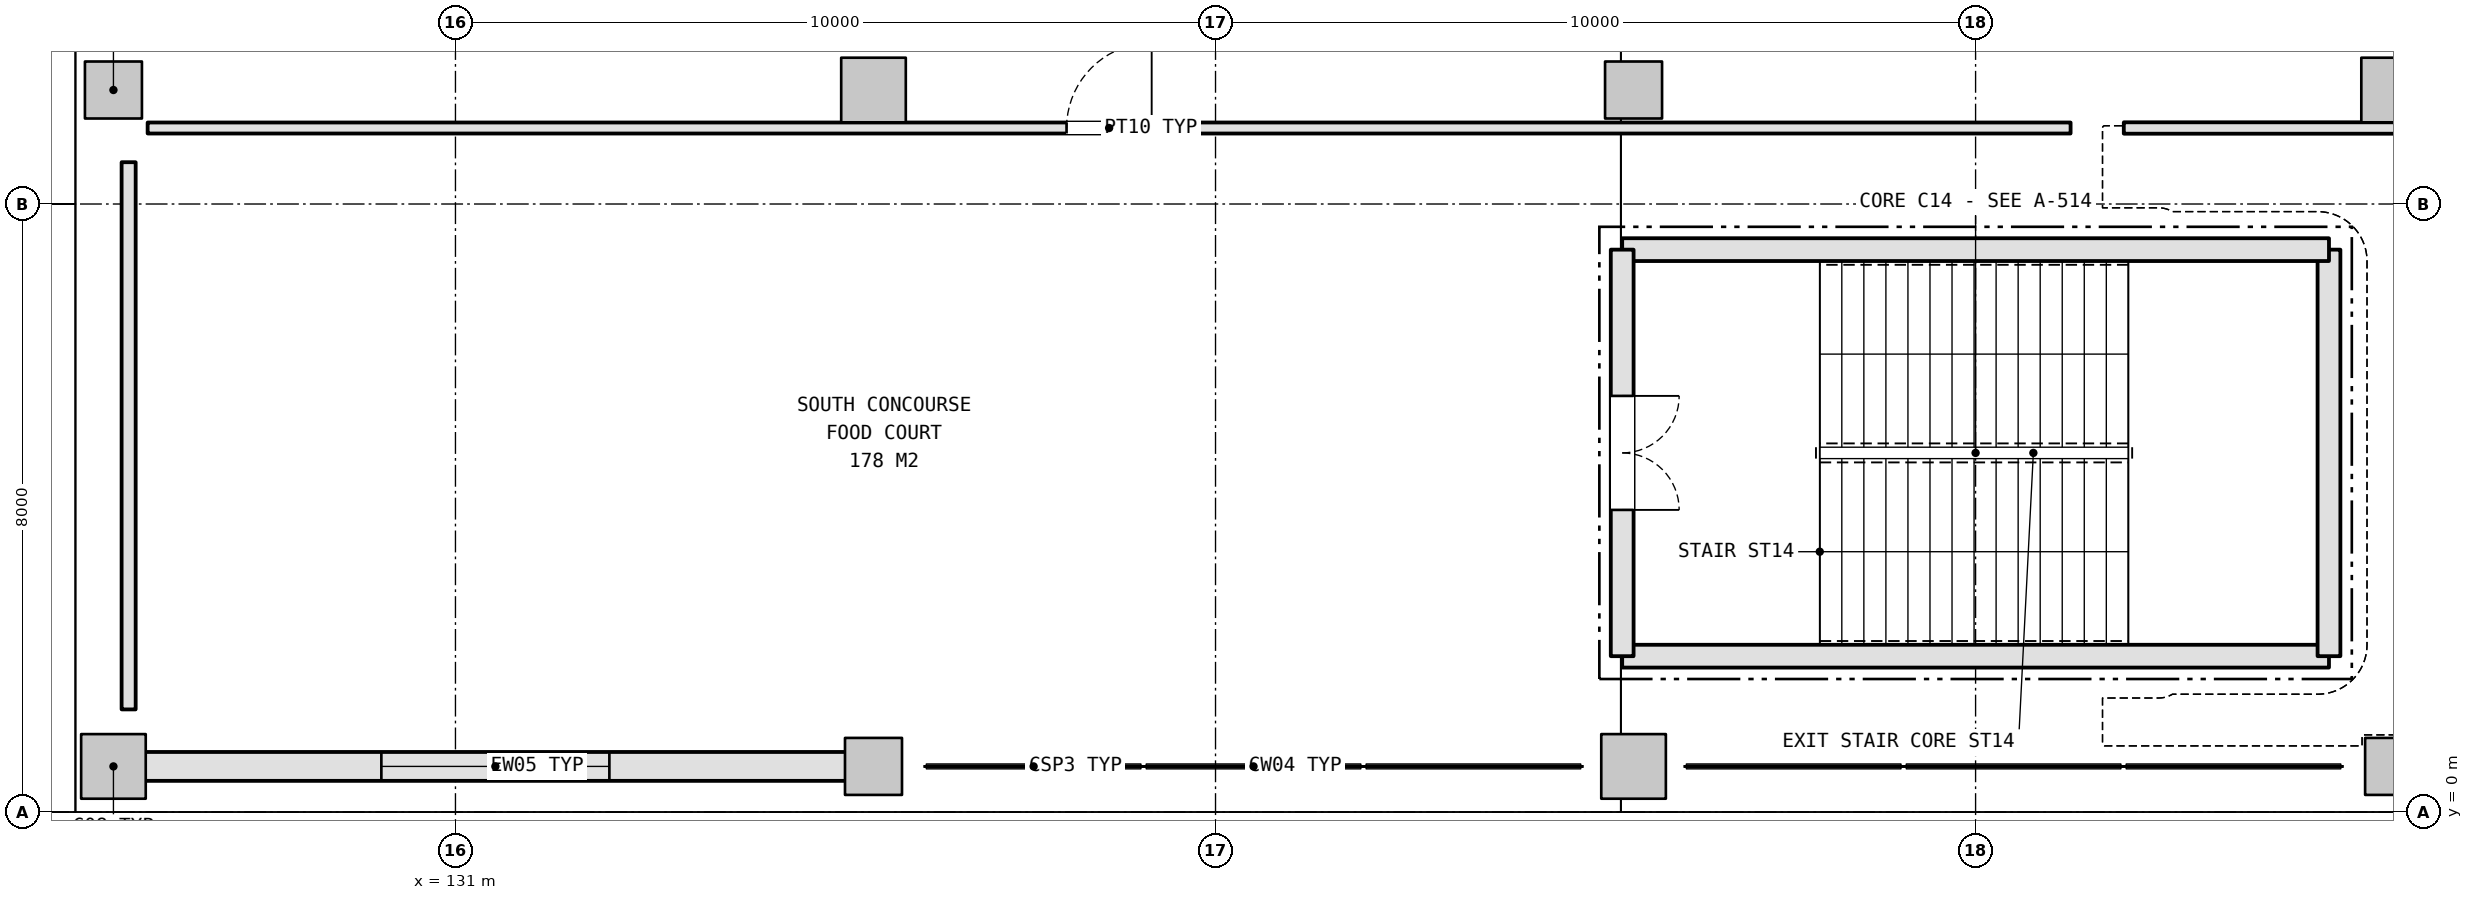
"""IFC4 building model, lengths in metres.
Left out: names, types, materials, properties, quantities, classifications, styles, units other than length and angle.
Written with IfcOpenShell. Run it as: python <this file> out.ifc"""

import sys

from ifc_helpers import new_model, si_unit, direction, frame, frame_2d, origin, origin_2d, place, context, subcontext, project, spatial, rectangle, extrude, element, fill, save


model = new_model("IFC4")
c1 = context("Model", 3, precision=1e-05, world=origin(), true_north=direction((0.0, 1.0)))
c2 = subcontext(c1, "Body", "Model", "MODEL_VIEW")
j1 = project(units=[si_unit("LENGTHUNIT", "METRE"), si_unit("PLANEANGLEUNIT", "RADIAN")], contexts=[c1])
p1 = place(None, origin())
s1 = spatial("IfcSite", under=j1, at=p1, CompositionType="ELEMENT")
p2 = place(p1, origin())
s2 = spatial("IfcBuilding", under=s1, at=p2, CompositionType="ELEMENT")
p3 = place(p2, frame((0.0, 0.0, 5.4)))
s3 = spatial("IfcBuildingStorey", under=s2, at=p3, CompositionType="ELEMENT", Elevation=5.4)
p4 = place(p3, frame((126.5, 0.6, 0.0), z_axis=(0.0, 0.0, 1.0), x_axis=(1.0, 0.0, 0.0)))
e1 = element("IfcColumn", 1, at=p4, inside=s3, PredefinedType="COLUMN", context=c2, shape_type="SweptSolid", body=[
    extrude(rectangle(XDim=0.85, YDim=0.85, at=origin_2d()), origin(), (0.0, 0.0, 1.0), 5.4),
])
for number, where, z_axis, x_axis in (
    (2, (126.5, 9.5, 0.0), (0.0, 0.0, 1.0), (1.0, 0.0, 0.0)),
    (3, (136.5, 0.6, 0.0), (0.0, 0.0, 1.0), (1.0, 0.0, 0.0)),
):
    element("IfcColumn", number, at=place(p3, frame(where, z_axis=z_axis, x_axis=x_axis)), inside=s3, PredefinedType="COLUMN", context=c2, shape_type="SweptSolid", body=[
        extrude(rectangle(XDim=0.75, YDim=0.75, at=origin_2d()), origin(), (0.0, 0.0, 1.0), 5.4),
    ])
for number, where, z_axis, x_axis in (
    (4, (136.5, 9.5, 0.0), (0.0, 0.0, 1.0), (1.0, 0.0, 0.0)),
    (5, (146.5, 0.6, 0.0), (0.0, 0.0, 1.0), (1.0, 0.0, 0.0)),
):
    element("IfcColumn", number, at=place(p3, frame(where, z_axis=z_axis, x_axis=x_axis)), inside=s3, PredefinedType="COLUMN", context=c2, shape_type="SweptSolid", body=[
        extrude(rectangle(XDim=0.85, YDim=0.85, at=origin_2d()), origin(), (0.0, 0.0, 1.0), 5.4),
    ])
for number, where, z_axis, x_axis in (
    (6, (146.5, 9.5, 0.0), (0.0, 0.0, 1.0), (1.0, 0.0, 0.0)),
    (7, (156.5, 0.6, 0.0), (0.0, 0.0, 1.0), (1.0, 0.0, 0.0)),
):
    element("IfcColumn", number, at=place(p3, frame(where, z_axis=z_axis, x_axis=x_axis)), inside=s3, PredefinedType="COLUMN", context=c2, shape_type="SweptSolid", body=[
        extrude(rectangle(XDim=0.75, YDim=0.75, at=origin_2d()), origin(), (0.0, 0.0, 1.0), 5.4),
    ])
p5 = place(p3, frame((156.5, 9.5, 0.0), z_axis=(0.0, 0.0, 1.0), x_axis=(1.0, 0.0, 0.0)))
e8 = element("IfcColumn", 8, at=p5, inside=s3, PredefinedType="COLUMN", context=c2, shape_type="SweptSolid", body=[
    extrude(rectangle(XDim=0.85, YDim=0.85, at=origin_2d()), origin(), (0.0, 0.0, 1.0), 5.4),
])
p6 = place(p3, frame((126.913, 0.6, 0.0), z_axis=(0.0, 0.0, 1.0), x_axis=(1.0, 0.0, 0.0)))
e9 = element("IfcWall", 9, at=p6, inside=s3, PredefinedType="SOLIDWALL", context=c2, shape_type="SweptSolid", body=[
    extrude(rectangle(XDim=9.224, YDim=0.38, at=frame_2d((4.612, 0.0))), origin(), (0.0, 0.0, 1.0), 4.425),
])
p7 = place(p6, frame((3.112, 0.0, 1.05)))
e10 = element("IfcOpeningElement", 10, at=p7, cuts=e9, PredefinedType="OPENING", context=c2, shape_type="SweptSolid", body=[
    extrude(rectangle(XDim=3.0, YDim=2.4, at=frame_2d((1.5, 1.2))), frame((0.0, 0.2, 0.0), z_axis=(0.0, -1.0, 0.0), x_axis=(1.0, 0.0, 0.0)), (0.0, 0.0, 1.0), 0.4),
])
p8 = place(p3, frame((146.35, 2.05, 0.0), z_axis=(0.0, 0.0, 1.0), x_axis=(1.0, 0.0, 0.0)))
e11 = element("IfcWall", 11, at=p8, inside=s3, PredefinedType="SHEAR", context=c2, shape_type="SweptSolid", body=[
    extrude(rectangle(XDim=9.299, YDim=0.3, at=frame_2d((4.65, 0.0))), origin(), (0.0, 0.0, 1.0), 5.14),
])
p9 = place(p3, frame((155.65, 2.05, 0.0), z_axis=(0.0, 0.0, 1.0), x_axis=(0.0, 1.0, 0.0)))
e12 = element("IfcWall", 12, at=p9, inside=s3, PredefinedType="SHEAR", context=c2, shape_type="SweptSolid", body=[
    extrude(rectangle(XDim=5.349, YDim=0.3, at=frame_2d((2.675, 0.0))), origin(), (0.0, 0.0, 1.0), 5.14),
])
p10 = place(p3, frame((155.65, 7.4, 0.0), z_axis=(0.0, 0.0, 1.0), x_axis=(-1.0, 0.0, 0.0)))
e13 = element("IfcWall", 13, at=p10, inside=s3, PredefinedType="SHEAR", context=c2, shape_type="SweptSolid", body=[
    extrude(rectangle(XDim=9.299, YDim=0.3, at=frame_2d((4.65, 0.0))), origin(), (0.0, 0.0, 1.0), 5.14),
])
p11 = place(p3, frame((146.35, 7.4, 0.0), z_axis=(0.0, 0.0, 1.0), x_axis=(0.0, -1.0, 0.0)))
e14 = element("IfcWall", 14, at=p11, inside=s3, PredefinedType="SHEAR", context=c2, shape_type="SweptSolid", body=[
    extrude(rectangle(XDim=5.349, YDim=0.3, at=frame_2d((2.675, 0.0))), origin(), (0.0, 0.0, 1.0), 5.14),
])
p12 = place(p11, frame((1.925, 0.0, 0.0)))
e15 = element("IfcOpeningElement", 15, at=p12, cuts=e14, PredefinedType="OPENING", context=c2, shape_type="SweptSolid", body=[
    extrude(rectangle(XDim=1.5, YDim=2.2, at=frame_2d((0.75, 1.1))), frame((0.0, 0.16, 0.0), z_axis=(0.0, -1.0, 0.0), x_axis=(1.0, 0.0, 0.0)), (0.0, 0.0, 1.0), 0.32),
])
p13 = place(p3, frame((126.95, 9.0, 0.0), z_axis=(0.0, 0.0, 1.0), x_axis=(1.0, 0.0, 0.0)))
e16 = element("IfcWall", 16, at=p13, inside=s3, PredefinedType="PARTITIONING", context=c2, shape_type="SweptSolid", body=[
    extrude(rectangle(XDim=25.3, YDim=0.145, at=frame_2d((12.65, 0.0))), origin(), (0.0, 0.0, 1.0), 4.425),
])
p14 = place(p13, frame((12.09, 0.0, 0.0)))
e17 = element("IfcOpeningElement", 17, at=p14, cuts=e16, PredefinedType="OPENING", context=c2, shape_type="SweptSolid", body=[
    extrude(rectangle(XDim=1.12, YDim=2.2, at=frame_2d((0.56, 1.1))), frame((0.0, 0.083, 0.0), z_axis=(0.0, -1.0, 0.0), x_axis=(1.0, 0.0, 0.0)), (0.0, 0.0, 1.0), 0.165),
])
p15 = place(p3, frame((126.7, 1.35, 0.0), z_axis=(0.0, 0.0, 1.0), x_axis=(0.0, 1.0, 0.0)))
e18 = element("IfcWall", 18, at=p15, inside=s3, PredefinedType="PARTITIONING", context=c2, shape_type="SweptSolid", body=[
    extrude(rectangle(XDim=7.2, YDim=0.185, at=frame_2d((3.6, 0.0))), origin(), (0.0, 0.0, 1.0), 4.475),
])
p16 = place(p3, frame((152.95, 9.0, 0.0), z_axis=(0.0, 0.0, 1.0), x_axis=(1.0, 0.0, 0.0)))
e19 = element("IfcWall", 19, at=p16, inside=s3, PredefinedType="PARTITIONING", context=c2, shape_type="SweptSolid", body=[
    extrude(rectangle(XDim=17.3, YDim=0.15, at=frame_2d((8.65, 0.0))), origin(), (0.0, 0.0, 1.0), 4.425),
])
p17 = place(p16, frame((8.15, 0.0, 0.0)))
e20 = element("IfcOpeningElement", 20, at=p17, cuts=e19, PredefinedType="OPENING", context=c2, shape_type="SweptSolid", body=[
    extrude(rectangle(XDim=1.0, YDim=2.1, at=frame_2d((0.5, 1.05))), frame((0.0, 0.085, 0.0), z_axis=(0.0, -1.0, 0.0), x_axis=(1.0, 0.0, 0.0)), (0.0, 0.0, 1.0), 0.17),
])
p18 = place(p7, origin())
e21 = element("IfcWindow", 21, at=p18, inside=s3, PartitioningType="SINGLE_PANEL", PredefinedType="WINDOW", context=c2, shape_type="SweptSolid", body=[
    extrude(rectangle(XDim=3.0, YDim=2.4, at=frame_2d((1.5, 1.2))), frame((0.0, 0.03, 0.0), z_axis=(0.0, -1.0, 0.0), x_axis=(1.0, 0.0, 0.0)), (0.0, 0.0, 1.0), 0.06),
])
fill(e10, e21)
p19 = place(p12, origin())
e22 = element("IfcDoor", 22, at=p19, inside=s3, OperationType="DOUBLE_DOOR_SINGLE_SWING", PredefinedType="DOOR", context=c2, shape_type="SweptSolid", body=[
    extrude(rectangle(XDim=1.5, YDim=2.2, at=frame_2d((0.75, 1.1))), frame((0.0, 0.025, 0.0), z_axis=(0.0, -1.0, 0.0), x_axis=(1.0, 0.0, 0.0)), (0.0, 0.0, 1.0), 0.05),
])
fill(e15, e22)
p20 = place(p14, origin())
e23 = element("IfcDoor", 23, at=p20, inside=s3, OperationType="SINGLE_SWING_RIGHT", PredefinedType="DOOR", context=c2, shape_type="SweptSolid", body=[
    extrude(rectangle(XDim=1.12, YDim=2.2, at=frame_2d((0.56, 1.1))), frame((0.0, 0.025, 0.0), z_axis=(0.0, -1.0, 0.0), x_axis=(1.0, 0.0, 0.0)), (0.0, 0.0, 1.0), 0.05),
])
fill(e17, e23)
save(model, sys.argv[1])
